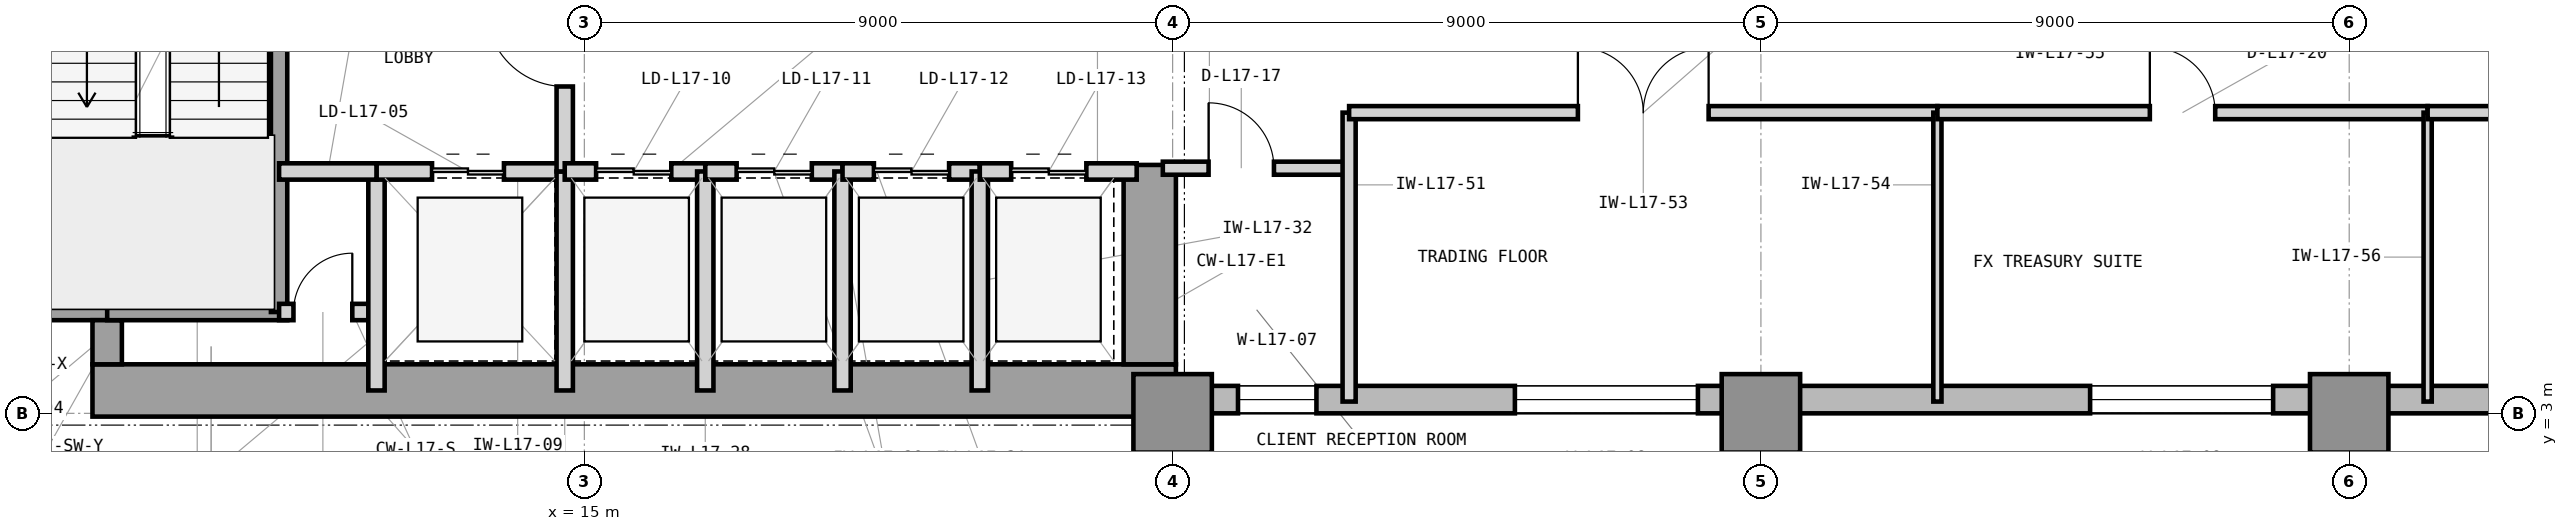
"""IFC4 building model, lengths in metres.
Left out: names, types, materials, properties, quantities, classifications, styles, units other than length and angle.
Written with IfcOpenShell. Run it as: python <this file> out.ifc"""

import sys

from ifc_helpers import new_model, si_unit, direction, frame, frame_2d, origin, origin_2d, place, context, subcontext, project, spatial, rectangle, extrude, element, fill, save


model = new_model("IFC4")
c1 = context("Model", 3, precision=1e-05, world=origin(), true_north=direction((0.0, 1.0)))
c2 = subcontext(c1, "Body", "Model", "MODEL_VIEW")
j1 = project(units=[si_unit("LENGTHUNIT", "METRE"), si_unit("PLANEANGLEUNIT", "RADIAN")], contexts=[c1])
p1 = place(None, origin())
s1 = spatial("IfcSite", under=j1, at=p1, CompositionType="ELEMENT")
p2 = place(p1, origin())
s2 = spatial("IfcBuilding", under=s1, at=p2, CompositionType="ELEMENT")
p3 = place(p2, frame((0.0, 0.0, 76.2)))
s3 = spatial("IfcBuildingStorey", under=s2, at=p3, CompositionType="ELEMENT", Elevation=76.2)
p4 = place(p3, frame((7.475, 3.35, 0.0), z_axis=(0.0, 0.0, 1.0), x_axis=(1.0, 0.0, 0.0)))
e1 = element("IfcWall", 1, at=p4, inside=s3, PredefinedType="SHEAR", context=c2, shape_type="SweptSolid", body=[
    extrude(rectangle(XDim=16.575, YDim=0.8, at=frame_2d((8.288, 0.0))), origin(), (0.0, 0.0, 1.0), 4.2),
])
p5 = place(p3, frame((23.65, 3.75, 0.0), z_axis=(0.0, 0.0, 1.0), x_axis=(0.0, 1.0, 0.0)))
e2 = element("IfcWall", 2, at=p5, inside=s3, PredefinedType="SHEAR", context=c2, shape_type="SweptSolid", body=[
    extrude(rectangle(XDim=3.05, YDim=0.8, at=frame_2d((1.525, 0.0))), origin(), (0.0, 0.0, 1.0), 4.2),
])
p6 = place(p3, frame((6.75, 4.65, 0.0), z_axis=(0.0, 0.0, 1.0), x_axis=(1.0, 0.0, 0.0)))
e3 = element("IfcWall", 3, at=p6, inside=s3, PredefinedType="SHEAR", context=c2, shape_type="SweptSolid", body=[
    extrude(rectangle(XDim=1.175, YDim=0.45, at=frame_2d((0.587, 0.0))), origin(), (0.0, 0.0, 1.0), 4.2),
])
p7 = place(p3, frame((7.7, 3.75, 0.0), z_axis=(0.0, 0.0, 1.0), x_axis=(0.0, 1.0, 0.0)))
e4 = element("IfcWall", 4, at=p7, inside=s3, PredefinedType="SHEAR", context=c2, shape_type="SweptSolid", body=[
    extrude(rectangle(XDim=0.675, YDim=0.45, at=frame_2d((0.337, 0.0))), origin(), (0.0, 0.0, 1.0), 4.2),
])
for number, where, z_axis, x_axis in (
    (5, (24.0, 3.0, 0.0), (0.0, 0.0, 1.0), (1.0, 0.0, 0.0)),
    (6, (33.0, 3.0, 0.0), (0.0, 0.0, 1.0), (1.0, 0.0, 0.0)),
    (7, (42.0, 3.0, 0.0), (0.0, 0.0, 1.0), (1.0, 0.0, 0.0)),
):
    element("IfcColumn", number, at=place(p3, frame(where, z_axis=z_axis, x_axis=x_axis)), inside=s3, PredefinedType="COLUMN", context=c2, shape_type="SweptSolid", body=[
        extrude(rectangle(XDim=1.2, YDim=1.2, at=origin_2d()), origin(), (0.0, 0.0, 1.0), 4.2),
    ])
p8 = place(p3, frame((23.9, 3.21, 0.0), z_axis=(0.0, 0.0, 1.0), x_axis=(1.0, 0.0, 0.0)))
e8 = element("IfcWall", 8, at=p8, inside=s3, PredefinedType="STANDARD", context=c2, shape_type="SweptSolid", body=[
    extrude(rectangle(XDim=40.5, YDim=0.42, at=frame_2d((20.25, 0.0))), origin(), (0.0, 0.0, 1.0), 3.98),
])
p9 = place(p8, frame((1.1, 0.0, 0.85)))
e9 = element("IfcOpeningElement", 9, at=p9, cuts=e8, PredefinedType="OPENING", context=c2, shape_type="SweptSolid", body=[
    extrude(rectangle(XDim=1.2, YDim=2.45, at=frame_2d((0.6, 1.225))), frame((0.0, 0.22, 0.0), z_axis=(0.0, -1.0, 0.0), x_axis=(1.0, 0.0, 0.0)), (0.0, 0.0, 1.0), 0.44),
])
p10 = place(p8, frame((5.336, 0.0, 0.85)))
e10 = element("IfcOpeningElement", 10, at=p10, cuts=e8, PredefinedType="OPENING", context=c2, shape_type="SweptSolid", body=[
    extrude(rectangle(XDim=2.8, YDim=2.45, at=frame_2d((1.4, 1.225))), frame((0.0, 0.22, 0.0), z_axis=(0.0, -1.0, 0.0), x_axis=(1.0, 0.0, 0.0)), (0.0, 0.0, 1.0), 0.44),
])
p11 = place(p8, frame((14.136, 0.0, 0.85)))
e11 = element("IfcOpeningElement", 11, at=p11, cuts=e8, PredefinedType="OPENING", context=c2, shape_type="SweptSolid", body=[
    extrude(rectangle(XDim=2.8, YDim=2.45, at=frame_2d((1.4, 1.225))), frame((0.0, 0.22, 0.0), z_axis=(0.0, -1.0, 0.0), x_axis=(1.0, 0.0, 0.0)), (0.0, 0.0, 1.0), 0.44),
])
p12 = place(p8, frame((20.336, 0.0, 0.85)))
e12 = element("IfcOpeningElement", 12, at=p12, cuts=e8, PredefinedType="OPENING", context=c2, shape_type="SweptSolid", body=[
    extrude(rectangle(XDim=2.8, YDim=2.45, at=frame_2d((1.4, 1.225))), frame((0.0, 0.22, 0.0), z_axis=(0.0, -1.0, 0.0), x_axis=(1.0, 0.0, 0.0)), (0.0, 0.0, 1.0), 0.44),
])
p13 = place(p3, frame((7.7, 4.55, 0.0), z_axis=(0.0, 0.0, 1.0), x_axis=(1.0, 0.0, 0.0)))
e13 = element("IfcWall", 13, at=p13, inside=s3, PredefinedType="SHEAR", context=c2, shape_type="SweptSolid", body=[
    extrude(rectangle(XDim=2.755, YDim=0.25, at=frame_2d((1.377, 0.0))), origin(), (0.0, 0.0, 1.0), 4.2),
])
p14 = place(p3, frame((10.33, 4.55, 0.0), z_axis=(0.0, 0.0, 1.0), x_axis=(0.0, 1.0, 0.0)))
e14 = element("IfcWall", 14, at=p14, inside=s3, PredefinedType="SHEAR", context=c2, shape_type="SweptSolid", body=[
    extrude(rectangle(XDim=7.45, YDim=0.25, at=frame_2d((3.725, 0.0))), origin(), (0.0, 0.0, 1.0), 4.2),
])
p15 = place(p14, frame((5.9, 0.0, 0.0)))
e15 = element("IfcOpeningElement", 15, at=p15, cuts=e14, PredefinedType="OPENING", context=c2, shape_type="SweptSolid", body=[
    extrude(rectangle(XDim=1.25, YDim=2.2, at=frame_2d((0.625, 1.1))), frame((0.0, 0.135, 0.0), z_axis=(0.0, -1.0, 0.0), x_axis=(1.0, 0.0, 0.0)), (0.0, 0.0, 1.0), 0.27),
])
p16 = place(p3, frame((10.33, 4.55, 0.0), z_axis=(0.0, 0.0, 1.0), x_axis=(1.0, 0.0, 0.0)))
e16 = element("IfcWall", 16, at=p16, inside=s3, PredefinedType="PARTITIONING", context=c2, shape_type="SweptSolid", body=[
    extrude(rectangle(XDim=1.49, YDim=0.25, at=frame_2d((0.745, 0.0))), origin(), (0.0, 0.0, 1.0), 3.97),
])
p17 = place(p16, frame((0.22, 0.0, 0.0)))
e17 = element("IfcOpeningElement", 17, at=p17, cuts=e16, PredefinedType="OPENING", context=c2, shape_type="SweptSolid", body=[
    extrude(rectangle(XDim=0.9, YDim=2.1, at=frame_2d((0.45, 1.05))), frame((0.0, 0.135, 0.0), z_axis=(0.0, -1.0, 0.0), x_axis=(1.0, 0.0, 0.0)), (0.0, 0.0, 1.0), 0.27),
])
p18 = place(p3, frame((11.82, 3.35, 0.0), z_axis=(0.0, 0.0, 1.0), x_axis=(0.0, 1.0, 0.0)))
e18 = element("IfcWall", 18, at=p18, inside=s3, PredefinedType="PARTITIONING", context=c2, shape_type="SweptSolid", body=[
    extrude(rectangle(XDim=3.35, YDim=0.25, at=frame_2d((1.675, 0.0))), origin(), (0.0, 0.0, 1.0), 3.97),
])
p19 = place(p3, frame((11.82, 6.7, 0.0), z_axis=(0.0, 0.0, 1.0), x_axis=(1.0, 0.0, 0.0)))
e19 = element("IfcWall", 19, at=p19, inside=s3, PredefinedType="PARTITIONING", context=c2, shape_type="SweptSolid", body=[
    extrude(rectangle(XDim=2.88, YDim=0.25, at=frame_2d((1.44, 0.0))), origin(), (0.0, 0.0, 1.0), 3.426),
])
p20 = place(p19, frame((0.85, 0.0, 0.0)))
e20 = element("IfcOpeningElement", 20, at=p20, cuts=e19, PredefinedType="OPENING", context=c2, shape_type="SweptSolid", body=[
    extrude(rectangle(XDim=1.1, YDim=2.25, at=frame_2d((0.55, 1.125))), frame((0.0, 0.135, 0.0), z_axis=(0.0, -1.0, 0.0), x_axis=(1.0, 0.0, 0.0)), (0.0, 0.0, 1.0), 0.27),
])
p21 = place(p3, frame((14.7, 3.35, 0.0), z_axis=(0.0, 0.0, 1.0), x_axis=(0.0, 1.0, 0.0)))
e21 = element("IfcWall", 21, at=p21, inside=s3, PredefinedType="PARTITIONING", context=c2, shape_type="SweptSolid", body=[
    extrude(rectangle(XDim=3.35, YDim=0.25, at=frame_2d((1.675, 0.0))), origin(), (0.0, 0.0, 1.0), 3.97),
])
p22 = place(p3, frame((14.7, 6.7, 0.0), z_axis=(0.0, 0.0, 1.0), x_axis=(0.0, 1.0, 0.0)))
e22 = element("IfcWall", 22, at=p22, inside=s3, PredefinedType="PARTITIONING", context=c2, shape_type="SweptSolid", body=[
    extrude(rectangle(XDim=3.8, YDim=0.25, at=frame_2d((1.9, 0.0))), origin(), (0.0, 0.0, 1.0), 3.97),
])
p23 = place(p22, frame((1.3, 0.0, 0.0)))
e23 = element("IfcOpeningElement", 23, at=p23, cuts=e22, PredefinedType="OPENING", context=c2, shape_type="SweptSolid", body=[
    extrude(rectangle(XDim=1.2, YDim=2.2, at=frame_2d((0.6, 1.1))), frame((0.0, 0.135, 0.0), z_axis=(0.0, -1.0, 0.0), x_axis=(1.0, 0.0, 0.0)), (0.0, 0.0, 1.0), 0.27),
])
p24 = place(p3, frame((10.33, 6.7, 0.0), z_axis=(0.0, 0.0, 1.0), x_axis=(1.0, 0.0, 0.0)))
e24 = element("IfcWall", 24, at=p24, inside=s3, PredefinedType="PARTITIONING", context=c2, shape_type="SweptSolid", body=[
    extrude(rectangle(XDim=1.49, YDim=0.25, at=frame_2d((0.745, 0.0))), origin(), (0.0, 0.0, 1.0), 3.426),
])
p25 = place(p3, frame((14.7, 6.7, 0.0), z_axis=(0.0, 0.0, 1.0), x_axis=(1.0, 0.0, 0.0)))
e25 = element("IfcWall", 25, at=p25, inside=s3, PredefinedType="PARTITIONING", context=c2, shape_type="SweptSolid", body=[
    extrude(rectangle(XDim=2.15, YDim=0.25, at=frame_2d((1.075, 0.0))), origin(), (0.0, 0.0, 1.0), 3.426),
])
p26 = place(p25, frame((0.48, 0.0, 0.0)))
e26 = element("IfcOpeningElement", 26, at=p26, cuts=e25, PredefinedType="OPENING", context=c2, shape_type="SweptSolid", body=[
    extrude(rectangle(XDim=1.15, YDim=2.25, at=frame_2d((0.575, 1.125))), frame((0.0, 0.135, 0.0), z_axis=(0.0, -1.0, 0.0), x_axis=(1.0, 0.0, 0.0)), (0.0, 0.0, 1.0), 0.27),
])
p27 = place(p3, frame((16.85, 3.35, 0.0), z_axis=(0.0, 0.0, 1.0), x_axis=(0.0, 1.0, 0.0)))
e27 = element("IfcWall", 27, at=p27, inside=s3, PredefinedType="PARTITIONING", context=c2, shape_type="SweptSolid", body=[
    extrude(rectangle(XDim=3.35, YDim=0.25, at=frame_2d((1.675, 0.0))), origin(), (0.0, 0.0, 1.0), 3.97),
])
p28 = place(p3, frame((16.85, 6.7, 0.0), z_axis=(0.0, 0.0, 1.0), x_axis=(1.0, 0.0, 0.0)))
e28 = element("IfcWall", 28, at=p28, inside=s3, PredefinedType="PARTITIONING", context=c2, shape_type="SweptSolid", body=[
    extrude(rectangle(XDim=2.1, YDim=0.25, at=frame_2d((1.05, 0.0))), origin(), (0.0, 0.0, 1.0), 3.426),
])
p29 = place(p28, frame((0.48, 0.0, 0.0)))
e29 = element("IfcOpeningElement", 29, at=p29, cuts=e28, PredefinedType="OPENING", context=c2, shape_type="SweptSolid", body=[
    extrude(rectangle(XDim=1.15, YDim=2.25, at=frame_2d((0.575, 1.125))), frame((0.0, 0.135, 0.0), z_axis=(0.0, -1.0, 0.0), x_axis=(1.0, 0.0, 0.0)), (0.0, 0.0, 1.0), 0.27),
])
p30 = place(p3, frame((18.95, 3.35, 0.0), z_axis=(0.0, 0.0, 1.0), x_axis=(0.0, 1.0, 0.0)))
e30 = element("IfcWall", 30, at=p30, inside=s3, PredefinedType="PARTITIONING", context=c2, shape_type="SweptSolid", body=[
    extrude(rectangle(XDim=3.35, YDim=0.25, at=frame_2d((1.675, 0.0))), origin(), (0.0, 0.0, 1.0), 3.97),
])
p31 = place(p3, frame((18.95, 6.7, 0.0), z_axis=(0.0, 0.0, 1.0), x_axis=(1.0, 0.0, 0.0)))
e31 = element("IfcWall", 31, at=p31, inside=s3, PredefinedType="PARTITIONING", context=c2, shape_type="SweptSolid", body=[
    extrude(rectangle(XDim=2.1, YDim=0.25, at=frame_2d((1.05, 0.0))), origin(), (0.0, 0.0, 1.0), 3.426),
])
p32 = place(p31, frame((0.48, 0.0, 0.0)))
e32 = element("IfcOpeningElement", 32, at=p32, cuts=e31, PredefinedType="OPENING", context=c2, shape_type="SweptSolid", body=[
    extrude(rectangle(XDim=1.15, YDim=2.25, at=frame_2d((0.575, 1.125))), frame((0.0, 0.135, 0.0), z_axis=(0.0, -1.0, 0.0), x_axis=(1.0, 0.0, 0.0)), (0.0, 0.0, 1.0), 0.27),
])
p33 = place(p3, frame((21.05, 3.35, 0.0), z_axis=(0.0, 0.0, 1.0), x_axis=(0.0, 1.0, 0.0)))
e33 = element("IfcWall", 33, at=p33, inside=s3, PredefinedType="PARTITIONING", context=c2, shape_type="SweptSolid", body=[
    extrude(rectangle(XDim=3.35, YDim=0.25, at=frame_2d((1.675, 0.0))), origin(), (0.0, 0.0, 1.0), 3.97),
])
p34 = place(p3, frame((21.05, 6.7, 0.0), z_axis=(0.0, 0.0, 1.0), x_axis=(1.0, 0.0, 0.0)))
e34 = element("IfcWall", 34, at=p34, inside=s3, PredefinedType="PARTITIONING", context=c2, shape_type="SweptSolid", body=[
    extrude(rectangle(XDim=2.4, YDim=0.25, at=frame_2d((1.2, 0.0))), origin(), (0.0, 0.0, 1.0), 3.426),
])
p35 = place(p34, frame((0.48, 0.0, 0.0)))
e35 = element("IfcOpeningElement", 35, at=p35, cuts=e34, PredefinedType="OPENING", context=c2, shape_type="SweptSolid", body=[
    extrude(rectangle(XDim=1.15, YDim=2.25, at=frame_2d((0.575, 1.125))), frame((0.0, 0.135, 0.0), z_axis=(0.0, -1.0, 0.0), x_axis=(1.0, 0.0, 0.0)), (0.0, 0.0, 1.0), 0.27),
])
p36 = place(p3, frame((23.85, 6.75, 0.0), z_axis=(0.0, 0.0, 1.0), x_axis=(1.0, 0.0, 0.0)))
e36 = element("IfcWall", 36, at=p36, inside=s3, PredefinedType="PARTITIONING", context=c2, shape_type="SweptSolid", body=[
    extrude(rectangle(XDim=2.85, YDim=0.2, at=frame_2d((1.425, 0.0))), origin(), (0.0, 0.0, 1.0), 3.97),
])
p37 = place(p36, frame((0.7, 0.0, 0.0)))
e37 = element("IfcOpeningElement", 37, at=p37, cuts=e36, PredefinedType="OPENING", context=c2, shape_type="SweptSolid", body=[
    extrude(rectangle(XDim=1.0, YDim=2.15, at=frame_2d((0.5, 1.075))), frame((0.0, 0.11, 0.0), z_axis=(0.0, -1.0, 0.0), x_axis=(1.0, 0.0, 0.0)), (0.0, 0.0, 1.0), 0.22),
])
p38 = place(p3, frame((26.7, 3.18, 0.0), z_axis=(0.0, 0.0, 1.0), x_axis=(0.0, 1.0, 0.0)))
e38 = element("IfcWall", 38, at=p38, inside=s3, PredefinedType="PARTITIONING", context=c2, shape_type="SweptSolid", body=[
    extrude(rectangle(XDim=4.42, YDim=0.2, at=frame_2d((2.21, 0.0))), origin(), (0.0, 0.0, 1.0), 3.97),
])
p39 = place(p3, frame((26.7, 7.6, 0.0), z_axis=(0.0, 0.0, 1.0), x_axis=(1.0, 0.0, 0.0)))
e39 = element("IfcWall", 39, at=p39, inside=s3, PredefinedType="PARTITIONING", context=c2, shape_type="SweptSolid", body=[
    extrude(rectangle(XDim=9.0, YDim=0.2, at=frame_2d((4.5, 0.0))), origin(), (0.0, 0.0, 1.0), 3.97),
])
p40 = place(p39, frame((3.5, 0.0, 0.0)))
e40 = element("IfcOpeningElement", 40, at=p40, cuts=e39, PredefinedType="OPENING", context=c2, shape_type="SweptSolid", body=[
    extrude(rectangle(XDim=2.0, YDim=2.5, at=frame_2d((1.0, 1.25))), frame((0.0, 0.11, 0.0), z_axis=(0.0, -1.0, 0.0), x_axis=(1.0, 0.0, 0.0)), (0.0, 0.0, 1.0), 0.22),
])
p41 = place(p3, frame((35.7, 3.18, 0.0), z_axis=(0.0, 0.0, 1.0), x_axis=(0.0, 1.0, 0.0)))
e41 = element("IfcWall", 41, at=p41, inside=s3, PredefinedType="PARTITIONING", context=c2, shape_type="SweptSolid", body=[
    extrude(rectangle(XDim=4.42, YDim=0.125, at=frame_2d((2.21, 0.0))), origin(), (0.0, 0.0, 1.0), 3.97),
])
p42 = place(p3, frame((35.7, 7.6, 0.0), z_axis=(0.0, 0.0, 1.0), x_axis=(1.0, 0.0, 0.0)))
e42 = element("IfcWall", 42, at=p42, inside=s3, PredefinedType="PARTITIONING", context=c2, shape_type="SweptSolid", body=[
    extrude(rectangle(XDim=7.5, YDim=0.2, at=frame_2d((3.75, 0.0))), origin(), (0.0, 0.0, 1.0), 3.97),
])
p43 = place(p42, frame((3.25, 0.0, 0.0)))
e43 = element("IfcOpeningElement", 43, at=p43, cuts=e42, PredefinedType="OPENING", context=c2, shape_type="SweptSolid", body=[
    extrude(rectangle(XDim=1.0, YDim=2.15, at=frame_2d((0.5, 1.075))), frame((0.0, 0.11, 0.0), z_axis=(0.0, -1.0, 0.0), x_axis=(1.0, 0.0, 0.0)), (0.0, 0.0, 1.0), 0.22),
])
p44 = place(p3, frame((43.2, 3.18, 0.0), z_axis=(0.0, 0.0, 1.0), x_axis=(0.0, 1.0, 0.0)))
e44 = element("IfcWall", 44, at=p44, inside=s3, PredefinedType="PARTITIONING", context=c2, shape_type="SweptSolid", body=[
    extrude(rectangle(XDim=4.42, YDim=0.125, at=frame_2d((2.21, 0.0))), origin(), (0.0, 0.0, 1.0), 3.97),
])
p45 = place(p3, frame((43.2, 7.6, 0.0), z_axis=(0.0, 0.0, 1.0), x_axis=(1.0, 0.0, 0.0)))
e45 = element("IfcWall", 45, at=p45, inside=s3, PredefinedType="PARTITIONING", context=c2, shape_type="SweptSolid", body=[
    extrude(rectangle(XDim=14.3, YDim=0.2, at=frame_2d((7.15, 0.0))), origin(), (0.0, 0.0, 1.0), 3.97),
])
p46 = place(p45, frame((6.4, 0.0, 0.0)))
e46 = element("IfcOpeningElement", 46, at=p46, cuts=e45, PredefinedType="OPENING", context=c2, shape_type="SweptSolid", body=[
    extrude(rectangle(XDim=1.5, YDim=2.3, at=frame_2d((0.75, 1.15))), frame((0.0, 0.11, 0.0), z_axis=(0.0, -1.0, 0.0), x_axis=(1.0, 0.0, 0.0)), (0.0, 0.0, 1.0), 0.22),
])
p47 = place(p17, origin())
e47 = element("IfcDoor", 47, at=p47, inside=s3, OperationType="SINGLE_SWING_RIGHT", PredefinedType="TRAPDOOR", context=c2, shape_type="SweptSolid", body=[
    extrude(rectangle(XDim=0.9, YDim=2.1, at=frame_2d((0.45, 1.05))), frame((0.0, 0.025, 0.0), z_axis=(0.0, -1.0, 0.0), x_axis=(1.0, 0.0, 0.0)), (0.0, 0.0, 1.0), 0.05),
])
fill(e17, e47)
p48 = place(p20, origin())
e48 = element("IfcDoor", 48, at=p48, inside=s3, OperationType="DOUBLE_DOOR_SLIDING", PredefinedType="DOOR", context=c2, shape_type="SweptSolid", body=[
    extrude(rectangle(XDim=1.1, YDim=2.25, at=frame_2d((0.55, 1.125))), frame((0.0, 0.025, 0.0), z_axis=(0.0, -1.0, 0.0), x_axis=(1.0, 0.0, 0.0)), (0.0, 0.0, 1.0), 0.05),
])
fill(e20, e48)
p49 = place(p23, origin())
e49 = element("IfcDoor", 49, at=p49, inside=s3, OperationType="SINGLE_SWING_RIGHT", PredefinedType="DOOR", context=c2, shape_type="SweptSolid", body=[
    extrude(rectangle(XDim=1.2, YDim=2.2, at=frame_2d((0.6, 1.1))), frame((0.0, 0.025, 0.0), z_axis=(0.0, -1.0, 0.0), x_axis=(1.0, 0.0, 0.0)), (0.0, 0.0, 1.0), 0.05),
])
fill(e23, e49)
p50 = place(p26, origin())
e50 = element("IfcDoor", 50, at=p50, inside=s3, OperationType="DOUBLE_DOOR_SLIDING", PredefinedType="DOOR", context=c2, shape_type="SweptSolid", body=[
    extrude(rectangle(XDim=1.15, YDim=2.25, at=frame_2d((0.575, 1.125))), frame((0.0, 0.025, 0.0), z_axis=(0.0, -1.0, 0.0), x_axis=(1.0, 0.0, 0.0)), (0.0, 0.0, 1.0), 0.05),
])
fill(e26, e50)
p51 = place(p29, origin())
e51 = element("IfcDoor", 51, at=p51, inside=s3, OperationType="DOUBLE_DOOR_SLIDING", PredefinedType="DOOR", context=c2, shape_type="SweptSolid", body=[
    extrude(rectangle(XDim=1.15, YDim=2.25, at=frame_2d((0.575, 1.125))), frame((0.0, 0.025, 0.0), z_axis=(0.0, -1.0, 0.0), x_axis=(1.0, 0.0, 0.0)), (0.0, 0.0, 1.0), 0.05),
])
fill(e29, e51)
p52 = place(p32, origin())
e52 = element("IfcDoor", 52, at=p52, inside=s3, OperationType="DOUBLE_DOOR_SLIDING", PredefinedType="DOOR", context=c2, shape_type="SweptSolid", body=[
    extrude(rectangle(XDim=1.15, YDim=2.25, at=frame_2d((0.575, 1.125))), frame((0.0, 0.025, 0.0), z_axis=(0.0, -1.0, 0.0), x_axis=(1.0, 0.0, 0.0)), (0.0, 0.0, 1.0), 0.05),
])
fill(e32, e52)
p53 = place(p35, origin())
e53 = element("IfcDoor", 53, at=p53, inside=s3, OperationType="DOUBLE_DOOR_SLIDING", PredefinedType="DOOR", context=c2, shape_type="SweptSolid", body=[
    extrude(rectangle(XDim=1.15, YDim=2.25, at=frame_2d((0.575, 1.125))), frame((0.0, 0.025, 0.0), z_axis=(0.0, -1.0, 0.0), x_axis=(1.0, 0.0, 0.0)), (0.0, 0.0, 1.0), 0.05),
])
fill(e35, e53)
p54 = place(p37, origin())
e54 = element("IfcDoor", 54, at=p54, inside=s3, OperationType="SINGLE_SWING_LEFT", PredefinedType="DOOR", context=c2, shape_type="SweptSolid", body=[
    extrude(rectangle(XDim=1.0, YDim=2.15, at=frame_2d((0.5, 1.075))), frame((0.0, 0.025, 0.0), z_axis=(0.0, -1.0, 0.0), x_axis=(1.0, 0.0, 0.0)), (0.0, 0.0, 1.0), 0.05),
])
fill(e37, e54)
p55 = place(p40, origin())
e55 = element("IfcDoor", 55, at=p55, inside=s3, OperationType="DOUBLE_DOOR_SINGLE_SWING", PredefinedType="DOOR", context=c2, shape_type="SweptSolid", body=[
    extrude(rectangle(XDim=2.0, YDim=2.5, at=frame_2d((1.0, 1.25))), frame((0.0, 0.025, 0.0), z_axis=(0.0, -1.0, 0.0), x_axis=(1.0, 0.0, 0.0)), (0.0, 0.0, 1.0), 0.05),
])
fill(e40, e55)
p56 = place(p43, origin())
e56 = element("IfcDoor", 56, at=p56, inside=s3, OperationType="SINGLE_SWING_LEFT", PredefinedType="DOOR", context=c2, shape_type="SweptSolid", body=[
    extrude(rectangle(XDim=1.0, YDim=2.15, at=frame_2d((0.5, 1.075))), frame((0.0, 0.025, 0.0), z_axis=(0.0, -1.0, 0.0), x_axis=(1.0, 0.0, 0.0)), (0.0, 0.0, 1.0), 0.05),
])
fill(e43, e56)
p57 = place(p9, origin())
e57 = element("IfcWindow", 57, at=p57, inside=s3, PartitioningType="SINGLE_PANEL", PredefinedType="WINDOW", context=c2, shape_type="SweptSolid", body=[
    extrude(rectangle(XDim=1.2, YDim=2.45, at=frame_2d((0.6, 1.225))), frame((0.0, 0.11, 0.0), z_axis=(0.0, -1.0, 0.0), x_axis=(1.0, 0.0, 0.0)), (0.0, 0.0, 1.0), 0.06),
])
fill(e9, e57)
p58 = place(p10, origin())
e58 = element("IfcWindow", 58, at=p58, inside=s3, PartitioningType="SINGLE_PANEL", PredefinedType="WINDOW", context=c2, shape_type="SweptSolid", body=[
    extrude(rectangle(XDim=2.8, YDim=2.45, at=frame_2d((1.4, 1.225))), frame((0.0, 0.11, 0.0), z_axis=(0.0, -1.0, 0.0), x_axis=(1.0, 0.0, 0.0)), (0.0, 0.0, 1.0), 0.06),
])
fill(e10, e58)
p59 = place(p11, origin())
e59 = element("IfcWindow", 59, at=p59, inside=s3, PartitioningType="SINGLE_PANEL", PredefinedType="WINDOW", context=c2, shape_type="SweptSolid", body=[
    extrude(rectangle(XDim=2.8, YDim=2.45, at=frame_2d((1.4, 1.225))), frame((0.0, 0.11, 0.0), z_axis=(0.0, -1.0, 0.0), x_axis=(1.0, 0.0, 0.0)), (0.0, 0.0, 1.0), 0.06),
])
fill(e11, e59)
save(model, sys.argv[1])
